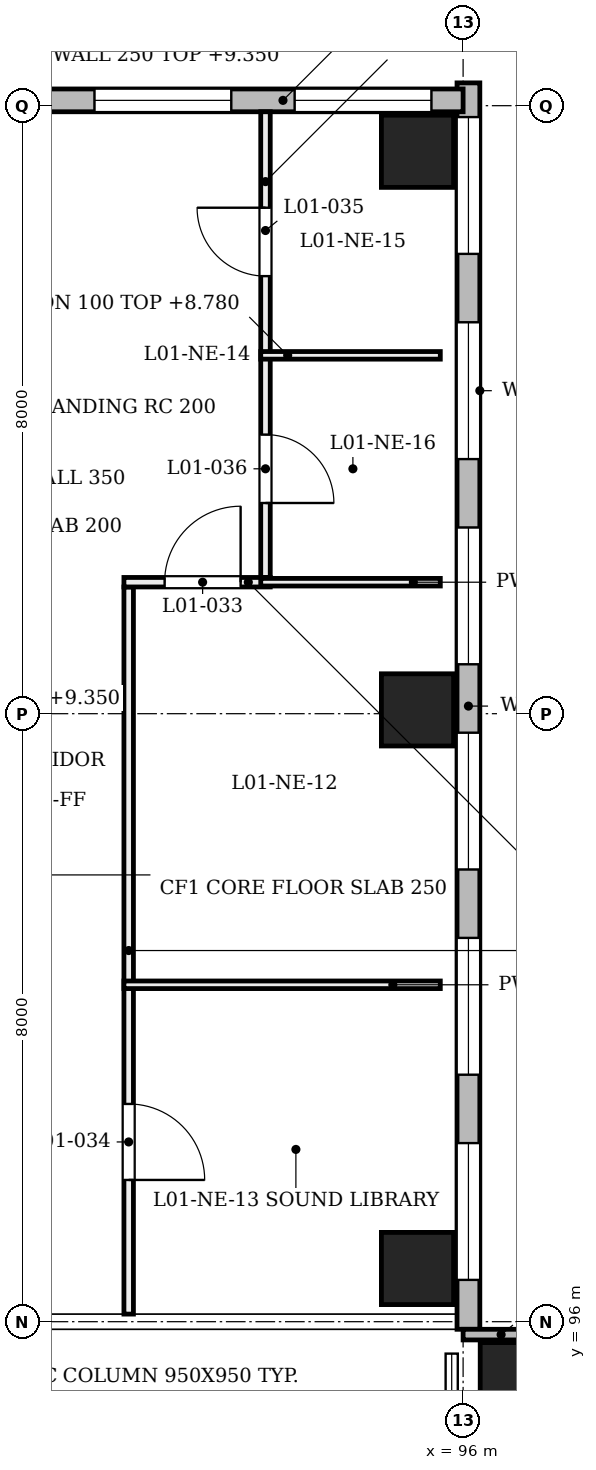
"""IFC4 building model, lengths in metres.
Left out: names, types, materials, properties, quantities, classifications, styles, units other than length and angle.
Written with IfcOpenShell. Run it as: python <this file> out.ifc"""

import sys

from ifc_helpers import new_model, si_unit, direction, frame, frame_2d, origin, origin_2d, place, context, subcontext, project, spatial, rectangle, extrude, element, fill, save


model = new_model("IFC4")
c1 = context("Model", 3, precision=1e-05, world=origin(), true_north=direction((0.0, 1.0)))
c2 = subcontext(c1, "Body", "Model", "MODEL_VIEW")
j1 = project(units=[si_unit("LENGTHUNIT", "METRE"), si_unit("PLANEANGLEUNIT", "RADIAN")], contexts=[c1])
p1 = place(None, origin())
s1 = spatial("IfcSite", under=j1, at=p1, CompositionType="ELEMENT")
p2 = place(p1, origin())
s2 = spatial("IfcBuilding", under=s1, at=p2, CompositionType="ELEMENT")
p3 = place(p2, frame((0.0, 0.0, 4.8)))
s3 = spatial("IfcBuildingStorey", under=s2, at=p3, CompositionType="ELEMENT", Elevation=4.8)
for number, where, z_axis, x_axis in (
    (1, (95.4, 96.7, 0.0), (0.0, 0.0, 1.0), (1.0, 0.0, 0.0)),
    (2, (95.4, 104.05, 0.0), (0.0, 0.0, 1.0), (1.0, 0.0, 0.0)),
    (3, (95.4, 111.4, 0.0), (0.0, 0.0, 1.0), (1.0, 0.0, 0.0)),
):
    element("IfcColumn", number, at=place(p3, frame(where, z_axis=z_axis, x_axis=x_axis)), inside=s3, PredefinedType="COLUMN", context=c2, shape_type="SweptSolid", body=[
        extrude(rectangle(XDim=0.95, YDim=0.95, at=origin_2d()), origin(), (0.0, 0.0, 1.0), 4.8),
    ])
p4 = place(p3, frame((96.4, 95.3, 0.0), z_axis=(0.203952265704, 0.0, 0.978980833987), x_axis=(0.0, 1.0, 0.0)))
e4 = element("IfcColumn", 4, at=p4, inside=s3, PredefinedType="COLUMN", context=c2, shape_type="SweptSolid", body=[
    extrude(rectangle(XDim=0.85, YDim=0.85, at=origin_2d()), origin(), (0.0, 0.0, 1.0), 4.903),
])
p5 = place(p3, frame((96.07, 95.9, 0.0), z_axis=(0.0, 0.0, 1.0), x_axis=(0.0, 1.0, 0.0)))
e5 = element("IfcWall", 5, at=p5, inside=s3, PredefinedType="SOLIDWALL", context=c2, shape_type="SweptSolid", body=[
    extrude(rectangle(XDim=16.4, YDim=0.3, at=frame_2d((8.2, 0.0))), origin(), (0.0, 0.0, 1.0), 3.9),
])
p6 = place(p5, frame((0.65, 0.0, 0.75)))
e6 = element("IfcOpeningElement", 6, at=p6, cuts=e5, PredefinedType="OPENING", context=c2, shape_type="SweptSolid", body=[
    extrude(rectangle(XDim=1.8, YDim=3.1, at=frame_2d((0.9, 1.55))), frame((0.0, 0.16, 0.0), z_axis=(0.0, -1.0, 0.0), x_axis=(1.0, 0.0, 0.0)), (0.0, 0.0, 1.0), 0.32),
])
p7 = place(p5, frame((3.35, 0.0, 0.75)))
e7 = element("IfcOpeningElement", 7, at=p7, cuts=e5, PredefinedType="OPENING", context=c2, shape_type="SweptSolid", body=[
    extrude(rectangle(XDim=1.8, YDim=3.1, at=frame_2d((0.9, 1.55))), frame((0.0, 0.16, 0.0), z_axis=(0.0, -1.0, 0.0), x_axis=(1.0, 0.0, 0.0)), (0.0, 0.0, 1.0), 0.32),
])
p8 = place(p5, frame((6.05, 0.0, 0.75)))
e8 = element("IfcOpeningElement", 8, at=p8, cuts=e5, PredefinedType="OPENING", context=c2, shape_type="SweptSolid", body=[
    extrude(rectangle(XDim=1.8, YDim=3.1, at=frame_2d((0.9, 1.55))), frame((0.0, 0.16, 0.0), z_axis=(0.0, -1.0, 0.0), x_axis=(1.0, 0.0, 0.0)), (0.0, 0.0, 1.0), 0.32),
])
p9 = place(p5, frame((8.75, 0.0, 0.75)))
e9 = element("IfcOpeningElement", 9, at=p9, cuts=e5, PredefinedType="OPENING", context=c2, shape_type="SweptSolid", body=[
    extrude(rectangle(XDim=1.8, YDim=3.1, at=frame_2d((0.9, 1.55))), frame((0.0, 0.16, 0.0), z_axis=(0.0, -1.0, 0.0), x_axis=(1.0, 0.0, 0.0)), (0.0, 0.0, 1.0), 0.32),
])
p10 = place(p5, frame((11.45, 0.0, 0.75)))
e10 = element("IfcOpeningElement", 10, at=p10, cuts=e5, PredefinedType="OPENING", context=c2, shape_type="SweptSolid", body=[
    extrude(rectangle(XDim=1.8, YDim=3.1, at=frame_2d((0.9, 1.55))), frame((0.0, 0.16, 0.0), z_axis=(0.0, -1.0, 0.0), x_axis=(1.0, 0.0, 0.0)), (0.0, 0.0, 1.0), 0.32),
])
p11 = place(p5, frame((14.15, 0.0, 0.75)))
e11 = element("IfcOpeningElement", 11, at=p11, cuts=e5, PredefinedType="OPENING", context=c2, shape_type="SweptSolid", body=[
    extrude(rectangle(XDim=1.8, YDim=3.1, at=frame_2d((0.9, 1.55))), frame((0.0, 0.16, 0.0), z_axis=(0.0, -1.0, 0.0), x_axis=(1.0, 0.0, 0.0)), (0.0, 0.0, 1.0), 0.32),
])
p12 = place(p3, frame((88.1, 112.07, 0.0), z_axis=(0.0, 0.0, 1.0), x_axis=(1.0, 0.0, 0.0)))
e12 = element("IfcWall", 12, at=p12, inside=s3, PredefinedType="SOLIDWALL", context=c2, shape_type="SweptSolid", body=[
    extrude(rectangle(XDim=7.9, YDim=0.3, at=frame_2d((3.95, 0.0))), origin(), (0.0, 0.0, 1.0), 3.9),
])
p13 = place(p12, frame((0.417, 0.0, 0.75)))
e13 = element("IfcOpeningElement", 13, at=p13, cuts=e12, PredefinedType="OPENING", context=c2, shape_type="SweptSolid", body=[
    extrude(rectangle(XDim=1.8, YDim=3.1, at=frame_2d((0.9, 1.55))), frame((0.0, 0.16, 0.0), z_axis=(0.0, -1.0, 0.0), x_axis=(1.0, 0.0, 0.0)), (0.0, 0.0, 1.0), 0.32),
])
p14 = place(p12, frame((3.05, 0.0, 0.75)))
e14 = element("IfcOpeningElement", 14, at=p14, cuts=e12, PredefinedType="OPENING", context=c2, shape_type="SweptSolid", body=[
    extrude(rectangle(XDim=1.8, YDim=3.1, at=frame_2d((0.9, 1.55))), frame((0.0, 0.16, 0.0), z_axis=(0.0, -1.0, 0.0), x_axis=(1.0, 0.0, 0.0)), (0.0, 0.0, 1.0), 0.32),
])
p15 = place(p12, frame((5.683, 0.0, 0.75)))
e15 = element("IfcOpeningElement", 15, at=p15, cuts=e12, PredefinedType="OPENING", context=c2, shape_type="SweptSolid", body=[
    extrude(rectangle(XDim=1.8, YDim=3.1, at=frame_2d((0.9, 1.55))), frame((0.0, 0.16, 0.0), z_axis=(0.0, -1.0, 0.0), x_axis=(1.0, 0.0, 0.0)), (0.0, 0.0, 1.0), 0.32),
])
p16 = place(p3, frame((96.0, 95.83, 0.0), z_axis=(0.0, 0.0, 1.0), x_axis=(1.0, 0.0, 0.0)))
e16 = element("IfcWall", 16, at=p16, inside=s3, PredefinedType="SOLIDWALL", context=c2, shape_type="SweptSolid", body=[
    extrude(rectangle(XDim=1.0, YDim=0.14, at=frame_2d((0.5, 0.0))), origin(), (0.0, 0.0, 1.0), 3.9),
])
p17 = place(p3, frame((91.6, 96.1, 0.0), z_axis=(0.0, 0.0, 1.0), x_axis=(0.0, 1.0, 0.0)))
e17 = element("IfcWall", 17, at=p17, inside=s3, PredefinedType="PARTITIONING", context=c2, shape_type="SweptSolid", body=[
    extrude(rectangle(XDim=9.567, YDim=0.125, at=frame_2d((4.783, 0.0))), origin(), (0.0, 0.0, 1.0), 3.88),
])
p18 = place(p17, frame((1.765, 0.0, 0.0)))
e18 = element("IfcOpeningElement", 18, at=p18, cuts=e17, PredefinedType="OPENING", context=c2, shape_type="SweptSolid", body=[
    extrude(rectangle(XDim=1.0, YDim=2.1, at=frame_2d((0.5, 1.05))), frame((0.0, 0.073, 0.0), z_axis=(0.0, -1.0, 0.0), x_axis=(1.0, 0.0, 0.0)), (0.0, 0.0, 1.0), 0.145),
])
p19 = place(p3, frame((93.4, 105.792, 0.0), z_axis=(0.0, 0.0, 1.0), x_axis=(0.0, 1.0, 0.0)))
e19 = element("IfcWall", 19, at=p19, inside=s3, PredefinedType="PARTITIONING", context=c2, shape_type="SweptSolid", body=[
    extrude(rectangle(XDim=6.128, YDim=0.125, at=frame_2d((3.064, 0.0))), origin(), (0.0, 0.0, 1.0), 3.88),
])
p20 = place(p19, frame((3.965, 0.0, 0.0)))
e20 = element("IfcOpeningElement", 20, at=p20, cuts=e19, PredefinedType="OPENING", context=c2, shape_type="SweptSolid", body=[
    extrude(rectangle(XDim=0.9, YDim=2.1, at=frame_2d((0.45, 1.05))), frame((0.0, 0.073, 0.0), z_axis=(0.0, -1.0, 0.0), x_axis=(1.0, 0.0, 0.0)), (0.0, 0.0, 1.0), 0.145),
])
p21 = place(p19, frame((0.98, 0.0, 0.0)))
e21 = element("IfcOpeningElement", 21, at=p21, cuts=e19, PredefinedType="OPENING", context=c2, shape_type="SweptSolid", body=[
    extrude(rectangle(XDim=0.9, YDim=2.1, at=frame_2d((0.45, 1.05))), frame((0.0, 0.073, 0.0), z_axis=(0.0, -1.0, 0.0), x_axis=(1.0, 0.0, 0.0)), (0.0, 0.0, 1.0), 0.145),
])
p22 = place(p3, frame((91.538, 100.433, 0.0), z_axis=(0.0, 0.0, 1.0), x_axis=(1.0, 0.0, 0.0)))
e22 = element("IfcWall", 22, at=p22, inside=s3, PredefinedType="PARTITIONING", context=c2, shape_type="SweptSolid", body=[
    extrude(rectangle(XDim=4.162, YDim=0.1, at=frame_2d((2.081, 0.0))), origin(), (0.0, 0.0, 1.0), 3.98),
])
p23 = place(p3, frame((91.538, 105.73, 0.0), z_axis=(0.0, 0.0, 1.0), x_axis=(1.0, 0.0, 0.0)))
e23 = element("IfcWall", 23, at=p23, inside=s3, PredefinedType="PARTITIONING", context=c2, shape_type="SweptSolid", body=[
    extrude(rectangle(XDim=1.925, YDim=0.125, at=frame_2d((0.962, 0.0))), origin(), (0.0, 0.0, 1.0), 4.56),
])
p24 = place(p23, frame((0.535, 0.0, 0.0)))
e24 = element("IfcOpeningElement", 24, at=p24, cuts=e23, PredefinedType="OPENING", context=c2, shape_type="SweptSolid", body=[
    extrude(rectangle(XDim=1.0, YDim=2.1, at=frame_2d((0.5, 1.05))), frame((0.0, 0.073, 0.0), z_axis=(0.0, -1.0, 0.0), x_axis=(1.0, 0.0, 0.0)), (0.0, 0.0, 1.0), 0.145),
])
for number, where, z_axis, x_axis in (
    (25, (93.337, 105.73, 0.0), (0.0, 0.0, 1.0), (1.0, 0.0, 0.0)),
    (26, (93.337, 108.715, 0.0), (0.0, 0.0, 1.0), (1.0, 0.0, 0.0)),
):
    element("IfcWall", number, at=place(p3, frame(where, z_axis=z_axis, x_axis=x_axis)), inside=s3, PredefinedType="PARTITIONING", context=c2, shape_type="SweptSolid", body=[
        extrude(rectangle(XDim=2.363, YDim=0.1, at=frame_2d((1.181, 0.0))), origin(), (0.0, 0.0, 1.0), 3.98),
    ])
p25 = place(p6, origin())
e27 = element("IfcWindow", 27, at=p25, inside=s3, PartitioningType="SINGLE_PANEL", PredefinedType="WINDOW", context=c2, shape_type="SweptSolid", body=[
    extrude(rectangle(XDim=1.8, YDim=3.1, at=frame_2d((0.9, 1.55))), frame((0.0, 0.03, 0.0), z_axis=(0.0, -1.0, 0.0), x_axis=(1.0, 0.0, 0.0)), (0.0, 0.0, 1.0), 0.06),
])
fill(e6, e27)
p26 = place(p7, origin())
e28 = element("IfcWindow", 28, at=p26, inside=s3, PartitioningType="SINGLE_PANEL", PredefinedType="WINDOW", context=c2, shape_type="SweptSolid", body=[
    extrude(rectangle(XDim=1.8, YDim=3.1, at=frame_2d((0.9, 1.55))), frame((0.0, 0.03, 0.0), z_axis=(0.0, -1.0, 0.0), x_axis=(1.0, 0.0, 0.0)), (0.0, 0.0, 1.0), 0.06),
])
fill(e7, e28)
p27 = place(p8, origin())
e29 = element("IfcWindow", 29, at=p27, inside=s3, PartitioningType="SINGLE_PANEL", PredefinedType="WINDOW", context=c2, shape_type="SweptSolid", body=[
    extrude(rectangle(XDim=1.8, YDim=3.1, at=frame_2d((0.9, 1.55))), frame((0.0, 0.03, 0.0), z_axis=(0.0, -1.0, 0.0), x_axis=(1.0, 0.0, 0.0)), (0.0, 0.0, 1.0), 0.06),
])
fill(e8, e29)
p28 = place(p9, origin())
e30 = element("IfcWindow", 30, at=p28, inside=s3, PartitioningType="SINGLE_PANEL", PredefinedType="WINDOW", context=c2, shape_type="SweptSolid", body=[
    extrude(rectangle(XDim=1.8, YDim=3.1, at=frame_2d((0.9, 1.55))), frame((0.0, 0.03, 0.0), z_axis=(0.0, -1.0, 0.0), x_axis=(1.0, 0.0, 0.0)), (0.0, 0.0, 1.0), 0.06),
])
fill(e9, e30)
p29 = place(p10, origin())
e31 = element("IfcWindow", 31, at=p29, inside=s3, PartitioningType="SINGLE_PANEL", PredefinedType="WINDOW", context=c2, shape_type="SweptSolid", body=[
    extrude(rectangle(XDim=1.8, YDim=3.1, at=frame_2d((0.9, 1.55))), frame((0.0, 0.03, 0.0), z_axis=(0.0, -1.0, 0.0), x_axis=(1.0, 0.0, 0.0)), (0.0, 0.0, 1.0), 0.06),
])
fill(e10, e31)
p30 = place(p11, origin())
e32 = element("IfcWindow", 32, at=p30, inside=s3, PartitioningType="SINGLE_PANEL", PredefinedType="WINDOW", context=c2, shape_type="SweptSolid", body=[
    extrude(rectangle(XDim=1.8, YDim=3.1, at=frame_2d((0.9, 1.55))), frame((0.0, 0.03, 0.0), z_axis=(0.0, -1.0, 0.0), x_axis=(1.0, 0.0, 0.0)), (0.0, 0.0, 1.0), 0.06),
])
fill(e11, e32)
p31 = place(p14, origin())
e33 = element("IfcWindow", 33, at=p31, inside=s3, PartitioningType="SINGLE_PANEL", PredefinedType="WINDOW", context=c2, shape_type="SweptSolid", body=[
    extrude(rectangle(XDim=1.8, YDim=3.1, at=frame_2d((0.9, 1.55))), frame((0.0, 0.03, 0.0), z_axis=(0.0, -1.0, 0.0), x_axis=(1.0, 0.0, 0.0)), (0.0, 0.0, 1.0), 0.06),
])
fill(e14, e33)
p32 = place(p15, origin())
e34 = element("IfcWindow", 34, at=p32, inside=s3, PartitioningType="SINGLE_PANEL", PredefinedType="WINDOW", context=c2, shape_type="SweptSolid", body=[
    extrude(rectangle(XDim=1.8, YDim=3.1, at=frame_2d((0.9, 1.55))), frame((0.0, 0.03, 0.0), z_axis=(0.0, -1.0, 0.0), x_axis=(1.0, 0.0, 0.0)), (0.0, 0.0, 1.0), 0.06),
])
fill(e15, e34)
p33 = place(p24, frame((1.0, 0.0, 0.0), z_axis=(0.0, 0.0, 1.0), x_axis=(-1.0, 0.0, 0.0)))
e35 = element("IfcDoor", 35, at=p33, inside=s3, OperationType="SINGLE_SWING_RIGHT", PredefinedType="DOOR", context=c2, shape_type="SweptSolid", body=[
    extrude(rectangle(XDim=1.0, YDim=2.1, at=frame_2d((0.5, 1.05))), frame((0.0, 0.025, 0.0), z_axis=(0.0, -1.0, 0.0), x_axis=(1.0, 0.0, 0.0)), (0.0, 0.0, 1.0), 0.05),
])
fill(e24, e35)
p34 = place(p18, frame((1.0, 0.0, 0.0), z_axis=(0.0, 0.0, 1.0), x_axis=(-1.0, 0.0, 0.0)))
e36 = element("IfcDoor", 36, at=p34, inside=s3, OperationType="SINGLE_SWING_LEFT", PredefinedType="DOOR", context=c2, shape_type="SweptSolid", body=[
    extrude(rectangle(XDim=1.0, YDim=2.1, at=frame_2d((0.5, 1.05))), frame((0.0, 0.025, 0.0), z_axis=(0.0, -1.0, 0.0), x_axis=(1.0, 0.0, 0.0)), (0.0, 0.0, 1.0), 0.05),
])
fill(e18, e36)
p35 = place(p20, frame((0.9, 0.0, 0.0), z_axis=(0.0, 0.0, 1.0), x_axis=(-1.0, 0.0, 0.0)))
e37 = element("IfcDoor", 37, at=p35, inside=s3, OperationType="SINGLE_SWING_RIGHT", PredefinedType="DOOR", context=c2, shape_type="SweptSolid", body=[
    extrude(rectangle(XDim=0.9, YDim=2.1, at=frame_2d((0.45, 1.05))), frame((0.0, 0.025, 0.0), z_axis=(0.0, -1.0, 0.0), x_axis=(1.0, 0.0, 0.0)), (0.0, 0.0, 1.0), 0.05),
])
fill(e20, e37)
p36 = place(p21, frame((0.9, 0.0, 0.0), z_axis=(0.0, 0.0, 1.0), x_axis=(-1.0, 0.0, 0.0)))
e38 = element("IfcDoor", 38, at=p36, inside=s3, OperationType="SINGLE_SWING_LEFT", PredefinedType="DOOR", context=c2, shape_type="SweptSolid", body=[
    extrude(rectangle(XDim=0.9, YDim=2.1, at=frame_2d((0.45, 1.05))), frame((0.0, 0.025, 0.0), z_axis=(0.0, -1.0, 0.0), x_axis=(1.0, 0.0, 0.0)), (0.0, 0.0, 1.0), 0.05),
])
fill(e21, e38)
save(model, sys.argv[1])
